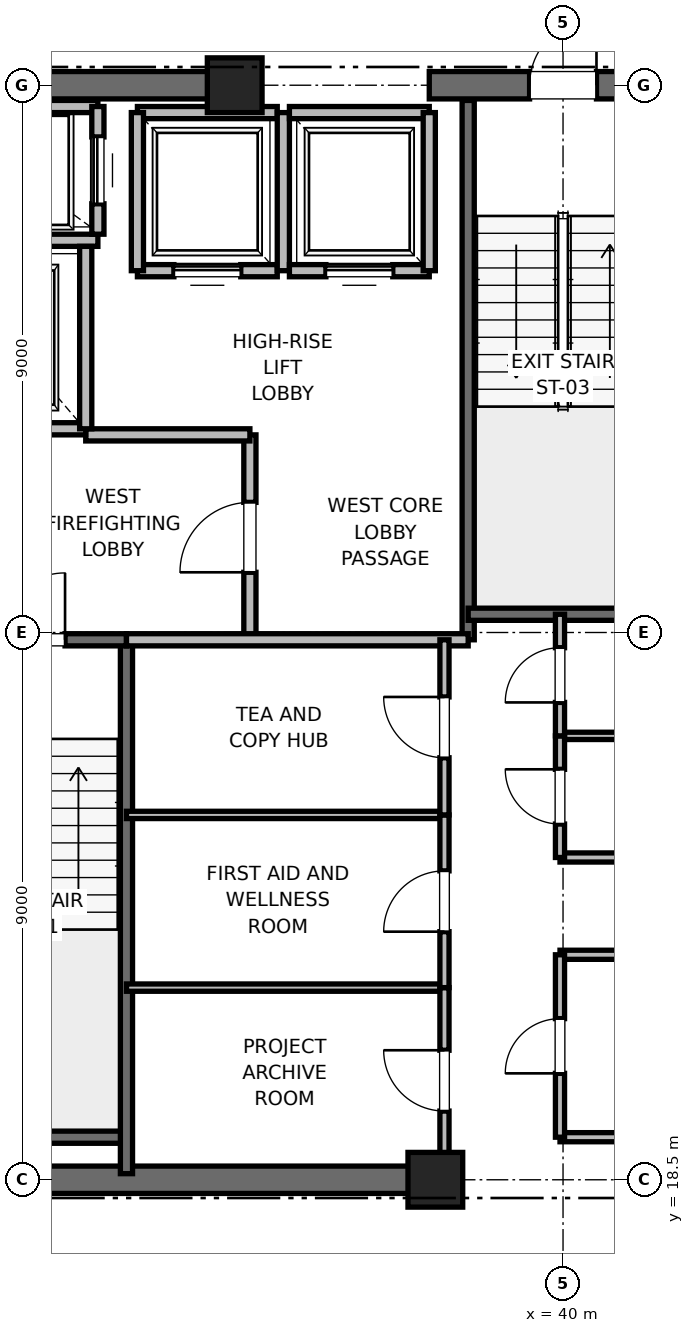
"""IFC4 building model, lengths in metres.
Left out: names, types, materials, properties, quantities, classifications, styles, units other than length and angle.
Written with IfcOpenShell. Run it as: python <this file> out.ifc"""

import sys

from ifc_helpers import new_model, si_unit, direction, frame, frame_2d, origin, origin_2d, place, context, subcontext, project, spatial, rectangle, extrude, element, fill, save


model = new_model("IFC4")
c1 = context("Model", 3, precision=1e-05, world=origin(), true_north=direction((0.0, 1.0)))
c2 = subcontext(c1, "Body", "Model", "MODEL_VIEW")
j1 = project(units=[si_unit("LENGTHUNIT", "METRE"), si_unit("PLANEANGLEUNIT", "RADIAN")], contexts=[c1])
p1 = place(None, origin())
s1 = spatial("IfcSite", under=j1, at=p1, CompositionType="ELEMENT")
p2 = place(p1, origin())
s2 = spatial("IfcBuilding", under=s1, at=p2, CompositionType="ELEMENT")
p3 = place(p2, frame((0.0, 0.0, 271.2)))
s3 = spatial("IfcBuildingStorey", under=s2, at=p3, CompositionType="ELEMENT", Elevation=271.2)
for number, where, z_axis, x_axis in (
    (1, (37.9, 18.5, 0.0), (0.0, 0.0, 1.0), (1.0, 0.0, 0.0)),
    (2, (34.6, 36.5, 0.0), (0.0, 0.0, 1.0), (1.0, 0.0, 0.0)),
):
    element("IfcColumn", number, at=place(p3, frame(where, z_axis=z_axis, x_axis=x_axis)), inside=s3, PredefinedType="PILASTER", context=c2, shape_type="SweptSolid", body=[
        extrude(rectangle(XDim=0.9, YDim=0.9, at=origin_2d()), origin(), (0.0, 0.0, 1.0), 4.0),
    ])
p4 = place(p3, frame((29.0, 18.5, 0.0), z_axis=(0.0, 0.0, 1.0), x_axis=(1.0, 0.0, 0.0)))
e3 = element("IfcWall", 3, at=p4, inside=s3, PredefinedType="SHEAR", context=c2, shape_type="SweptSolid", body=[
    extrude(rectangle(XDim=9.2, YDim=0.45, at=frame_2d((4.6, 0.0))), origin(), (0.0, 0.0, 1.0), 3.785),
])
p5 = place(p3, frame((29.0, 36.5, 0.0), z_axis=(0.0, 0.0, 1.0), x_axis=(1.0, 0.0, 0.0)))
e4 = element("IfcWall", 4, at=p5, inside=s3, PredefinedType="SHEAR", context=c2, shape_type="SweptSolid", body=[
    extrude(rectangle(XDim=5.8, YDim=0.45, at=frame_2d((2.9, 0.0))), origin(), (0.0, 0.0, 1.0), 3.785),
])
p6 = place(p3, frame((37.8, 36.5, 0.0), z_axis=(0.0, 0.0, 1.0), x_axis=(1.0, 0.0, 0.0)))
e5 = element("IfcWall", 5, at=p6, inside=s3, PredefinedType="SHEAR", context=c2, shape_type="SweptSolid", body=[
    extrude(rectangle(XDim=4.4, YDim=0.45, at=frame_2d((2.2, 0.0))), origin(), (0.0, 0.0, 1.0), 3.785),
])
p7 = place(p6, frame((1.65, 0.0, 0.0)))
e6 = element("IfcOpeningElement", 6, at=p7, cuts=e5, PredefinedType="OPENING", context=c2, shape_type="SweptSolid", body=[
    extrude(rectangle(XDim=1.1, YDim=2.15, at=frame_2d((0.55, 1.075))), frame((0.0, 0.225, 0.0), z_axis=(0.0, -1.0, 0.0), x_axis=(1.0, 0.0, 0.0)), (0.0, 0.0, 1.0), 0.45),
])
p8 = place(p3, frame((29.7, 19.2, 0.0), z_axis=(0.0, 0.0, 1.0), x_axis=(1.0, 0.0, 0.0)))
e7 = element("IfcWall", 7, at=p8, inside=s3, PredefinedType="SOLIDWALL", context=c2, shape_type="SweptSolid", body=[
    extrude(rectangle(XDim=3.12, YDim=0.2, at=frame_2d((1.56, 0.0))), origin(), (0.0, 0.0, 1.0), 3.785),
])
p9 = place(p3, frame((32.82, 18.6, 0.0), z_axis=(0.0, 0.0, 1.0), x_axis=(0.0, 1.0, 0.0)))
e8 = element("IfcWall", 8, at=p9, inside=s3, PredefinedType="SOLIDWALL", context=c2, shape_type="SweptSolid", body=[
    extrude(rectangle(XDim=8.78, YDim=0.2, at=frame_2d((4.39, 0.0))), origin(), (0.0, 0.0, 1.0), 3.785),
])
p10 = place(p3, frame((29.7, 27.38, 0.0), z_axis=(0.0, 0.0, 1.0), x_axis=(1.0, 0.0, 0.0)))
e9 = element("IfcWall", 9, at=p10, inside=s3, PredefinedType="SOLIDWALL", context=c2, shape_type="SweptSolid", body=[
    extrude(rectangle(XDim=3.12, YDim=0.2, at=frame_2d((1.56, 0.0))), origin(), (0.0, 0.0, 1.0), 3.785),
])
p11 = place(p10, frame((1.01, 0.0, 0.0)))
e10 = element("IfcOpeningElement", 10, at=p11, cuts=e9, PredefinedType="OPENING", context=c2, shape_type="SweptSolid", body=[
    extrude(rectangle(XDim=1.1, YDim=2.15, at=frame_2d((0.55, 1.075))), frame((0.0, 0.1, 0.0), z_axis=(0.0, -1.0, 0.0), x_axis=(1.0, 0.0, 0.0)), (0.0, 0.0, 1.0), 0.2),
])
p12 = place(p3, frame((38.44, 27.38, 0.0), z_axis=(0.0, 0.0, 1.0), x_axis=(0.0, 1.0, 0.0)))
e11 = element("IfcWall", 11, at=p12, inside=s3, PredefinedType="SOLIDWALL", context=c2, shape_type="SweptSolid", body=[
    extrude(rectangle(XDim=8.87, YDim=0.2, at=frame_2d((4.435, 0.0))), origin(), (0.0, 0.0, 1.0), 3.785),
])
p13 = place(p3, frame((38.44, 27.8, 0.0), z_axis=(0.0, 0.0, 1.0), x_axis=(1.0, 0.0, 0.0)))
e12 = element("IfcWall", 12, at=p13, inside=s3, PredefinedType="SOLIDWALL", context=c2, shape_type="SweptSolid", body=[
    extrude(rectangle(XDim=3.32, YDim=0.2, at=frame_2d((1.66, 0.0))), origin(), (0.0, 0.0, 1.0), 3.785),
])
p14 = place(p3, frame((34.85, 27.38, 0.0), z_axis=(0.0, 0.0, 1.0), x_axis=(0.0, 1.0, 0.0)))
e13 = element("IfcWall", 13, at=p14, inside=s3, PredefinedType="PARTITIONING", context=c2, shape_type="SweptSolid", body=[
    extrude(rectangle(XDim=3.37, YDim=0.2, at=frame_2d((1.685, 0.0))), origin(), (0.0, 0.0, 1.0), 3.785),
])
p15 = place(p14, frame((1.11, 0.0, 0.0)))
e14 = element("IfcOpeningElement", 14, at=p15, cuts=e13, PredefinedType="OPENING", context=c2, shape_type="SweptSolid", body=[
    extrude(rectangle(XDim=1.15, YDim=2.2, at=frame_2d((0.575, 1.1))), frame((0.0, 0.1, 0.0), z_axis=(0.0, -1.0, 0.0), x_axis=(1.0, 0.0, 0.0)), (0.0, 0.0, 1.0), 0.2),
])
p16 = place(p3, frame((32.82, 27.38, 0.0), z_axis=(0.0, 0.0, 1.0), x_axis=(1.0, 0.0, 0.0)))
e15 = element("IfcWall", 15, at=p16, inside=s3, PredefinedType="PARTITIONING", context=c2, shape_type="SweptSolid", body=[
    extrude(rectangle(XDim=5.62, YDim=0.2, at=frame_2d((2.81, 0.0))), origin(), (0.0, 0.0, 1.0), 3.785),
])
p17 = place(p3, frame((32.15, 30.75, 0.0), z_axis=(0.0, 0.0, 1.0), x_axis=(1.0, 0.0, 0.0)))
e16 = element("IfcWall", 16, at=p17, inside=s3, PredefinedType="PARTITIONING", context=c2, shape_type="SweptSolid", body=[
    extrude(rectangle(XDim=2.7, YDim=0.2, at=frame_2d((1.35, 0.0))), origin(), (0.0, 0.0, 1.0), 3.785),
])
p18 = place(p3, frame((29.55, 30.85, 0.0), z_axis=(0.0, 0.0, 1.0), x_axis=(1.0, 0.0, 0.0)))
e17 = element("IfcWall", 17, at=p18, inside=s3, PredefinedType="SOLIDWALL", context=c2, shape_type="SweptSolid", body=[
    extrude(rectangle(XDim=2.6, YDim=0.2, at=frame_2d((1.3, 0.0))), origin(), (0.0, 0.0, 1.0), 2.865),
])
p19 = place(p18, frame((0.75, 0.0, 0.0)))
e18 = element("IfcOpeningElement", 18, at=p19, cuts=e17, PredefinedType="OPENING", context=c2, shape_type="SweptSolid", body=[
    extrude(rectangle(XDim=1.1, YDim=2.2, at=frame_2d((0.55, 1.1))), frame((0.0, 0.1, 0.0), z_axis=(0.0, -1.0, 0.0), x_axis=(1.0, 0.0, 0.0)), (0.0, 0.0, 1.0), 0.2),
])
p20 = place(p3, frame((29.55, 33.95, 0.0), z_axis=(0.0, 0.0, 1.0), x_axis=(1.0, 0.0, 0.0)))
e19 = element("IfcWall", 19, at=p20, inside=s3, PredefinedType="SOLIDWALL", context=c2, shape_type="SweptSolid", body=[
    extrude(rectangle(XDim=2.8, YDim=0.2, at=frame_2d((1.4, 0.0))), origin(), (0.0, 0.0, 1.0), 3.785),
])
p21 = place(p3, frame((32.15, 30.85, 0.0), z_axis=(0.0, 0.0, 1.0), x_axis=(0.0, 1.0, 0.0)))
e20 = element("IfcWall", 20, at=p21, inside=s3, PredefinedType="SOLIDWALL", context=c2, shape_type="SweptSolid", body=[
    extrude(rectangle(XDim=3.0, YDim=0.2, at=frame_2d((1.5, 0.0))), origin(), (0.0, 0.0, 1.0), 3.785),
])
p22 = place(p3, frame((32.35, 36.15, 0.0), z_axis=(0.0, 0.0, 1.0), x_axis=(-1.0, 0.0, 0.0)))
e21 = element("IfcWall", 21, at=p22, inside=s3, PredefinedType="SOLIDWALL", context=c2, shape_type="SweptSolid", body=[
    extrude(rectangle(XDim=2.8, YDim=0.2, at=frame_2d((1.4, 0.0))), origin(), (0.0, 0.0, 1.0), 3.148),
])
p23 = place(p3, frame((32.35, 34.05, 0.0), z_axis=(0.0, 0.0, 1.0), x_axis=(0.0, 1.0, 0.0)))
e22 = element("IfcWall", 22, at=p23, inside=s3, PredefinedType="SOLIDWALL", context=c2, shape_type="SweptSolid", body=[
    extrude(rectangle(XDim=2.1, YDim=0.2, at=frame_2d((1.05, 0.0))), origin(), (0.0, 0.0, 1.0), 3.785),
])
p24 = place(p23, frame((0.5, 0.0, 0.0)))
e23 = element("IfcOpeningElement", 23, at=p24, cuts=e22, PredefinedType="OPENING", context=c2, shape_type="SweptSolid", body=[
    extrude(rectangle(XDim=1.1, YDim=2.2, at=frame_2d((0.55, 1.1))), frame((0.0, 0.1, 0.0), z_axis=(0.0, -1.0, 0.0), x_axis=(1.0, 0.0, 0.0)), (0.0, 0.0, 1.0), 0.2),
])
p25 = place(p3, frame((33.0, 33.45, 0.0), z_axis=(0.0, 0.0, 1.0), x_axis=(1.0, 0.0, 0.0)))
e24 = element("IfcWall", 24, at=p25, inside=s3, PredefinedType="SOLIDWALL", context=c2, shape_type="SweptSolid", body=[
    extrude(rectangle(XDim=2.3, YDim=0.2, at=frame_2d((1.15, 0.0))), origin(), (0.0, 0.0, 1.0), 3.785),
])
p26 = place(p25, frame((0.6, 0.0, 0.0)))
e25 = element("IfcOpeningElement", 25, at=p26, cuts=e24, PredefinedType="OPENING", context=c2, shape_type="SweptSolid", body=[
    extrude(rectangle(XDim=1.1, YDim=2.2, at=frame_2d((0.55, 1.1))), frame((0.0, 0.1, 0.0), z_axis=(0.0, -1.0, 0.0), x_axis=(1.0, 0.0, 0.0)), (0.0, 0.0, 1.0), 0.2),
])
p27 = place(p3, frame((35.3, 36.05, 0.0), z_axis=(0.0, 0.0, 1.0), x_axis=(-1.0, 0.0, 0.0)))
e26 = element("IfcWall", 26, at=p27, inside=s3, PredefinedType="SOLIDWALL", context=c2, shape_type="SweptSolid", body=[
    extrude(rectangle(XDim=2.3, YDim=0.2, at=frame_2d((1.15, 0.0))), origin(), (0.0, 0.0, 1.0), 2.865),
])
p28 = place(p3, frame((33.0, 36.05, 0.0), z_axis=(0.0, 0.0, 1.0), x_axis=(0.0, -1.0, 0.0)))
e27 = element("IfcWall", 27, at=p28, inside=s3, PredefinedType="SOLIDWALL", context=c2, shape_type="SweptSolid", body=[
    extrude(rectangle(XDim=2.6, YDim=0.2, at=frame_2d((1.3, 0.0))), origin(), (0.0, 0.0, 1.0), 3.785),
])
p29 = place(p3, frame((35.4, 33.45, 0.0), z_axis=(0.0, 0.0, 1.0), x_axis=(0.0, 1.0, 0.0)))
e28 = element("IfcWall", 28, at=p29, inside=s3, PredefinedType="SOLIDWALL", context=c2, shape_type="SweptSolid", body=[
    extrude(rectangle(XDim=2.6, YDim=0.2, at=frame_2d((1.3, 0.0))), origin(), (0.0, 0.0, 1.0), 2.865),
])
p30 = place(p3, frame((35.5, 33.45, 0.0), z_axis=(0.0, 0.0, 1.0), x_axis=(1.0, 0.0, 0.0)))
e29 = element("IfcWall", 29, at=p30, inside=s3, PredefinedType="SOLIDWALL", context=c2, shape_type="SweptSolid", body=[
    extrude(rectangle(XDim=2.3, YDim=0.2, at=frame_2d((1.15, 0.0))), origin(), (0.0, 0.0, 1.0), 3.785),
])
p31 = place(p30, frame((0.6, 0.0, 0.0)))
e30 = element("IfcOpeningElement", 30, at=p31, cuts=e29, PredefinedType="OPENING", context=c2, shape_type="SweptSolid", body=[
    extrude(rectangle(XDim=1.1, YDim=2.2, at=frame_2d((0.55, 1.1))), frame((0.0, 0.1, 0.0), z_axis=(0.0, -1.0, 0.0), x_axis=(1.0, 0.0, 0.0)), (0.0, 0.0, 1.0), 0.2),
])
p32 = place(p3, frame((37.8, 36.05, 0.0), z_axis=(0.0, 0.0, 1.0), x_axis=(-1.0, 0.0, 0.0)))
e31 = element("IfcWall", 31, at=p32, inside=s3, PredefinedType="SOLIDWALL", context=c2, shape_type="SweptSolid", body=[
    extrude(rectangle(XDim=2.3, YDim=0.2, at=frame_2d((1.15, 0.0))), origin(), (0.0, 0.0, 1.0), 2.865),
])
p33 = place(p3, frame((37.8, 33.45, 0.0), z_axis=(0.0, 0.0, 1.0), x_axis=(0.0, 1.0, 0.0)))
e32 = element("IfcWall", 32, at=p33, inside=s3, PredefinedType="SOLIDWALL", context=c2, shape_type="SweptSolid", body=[
    extrude(rectangle(XDim=2.6, YDim=0.2, at=frame_2d((1.3, 0.0))), origin(), (0.0, 0.0, 1.0), 2.865),
])
for number, where, z_axis, x_axis in (
    (33, (39.95, 19.2, 0.0), (0.0, 0.0, 1.0), (1.0, 0.0, 0.0)),
    (34, (39.95, 22.2, 0.0), (0.0, 0.0, 1.0), (1.0, 0.0, 0.0)),
    (35, (39.95, 23.8, 0.0), (0.0, 0.0, 1.0), (1.0, 0.0, 0.0)),
):
    element("IfcWall", number, at=place(p3, frame(where, z_axis=z_axis, x_axis=x_axis)), inside=s3, PredefinedType="PARTITIONING", context=c2, shape_type="SweptSolid", body=[
        extrude(rectangle(XDim=1.81, YDim=0.15, at=frame_2d((0.905, 0.0))), origin(), (0.0, 0.0, 1.0), 2.85),
    ])
p34 = place(p3, frame((39.95, 25.8, 0.0), z_axis=(0.0, 0.0, 1.0), x_axis=(1.0, 0.0, 0.0)))
e36 = element("IfcWall", 36, at=p34, inside=s3, PredefinedType="PARTITIONING", context=c2, shape_type="SweptSolid", body=[
    extrude(rectangle(XDim=1.81, YDim=0.12, at=frame_2d((0.905, 0.0))), origin(), (0.0, 0.0, 1.0), 2.85),
])
p35 = place(p3, frame((39.95, 19.2, 0.0), z_axis=(0.0, 0.0, 1.0), x_axis=(0.0, 1.0, 0.0)))
e37 = element("IfcWall", 37, at=p35, inside=s3, PredefinedType="PARTITIONING", context=c2, shape_type="SweptSolid", body=[
    extrude(rectangle(XDim=3.0, YDim=0.15, at=frame_2d((1.5, 0.0))), origin(), (0.0, 0.0, 1.0), 2.85),
])
p36 = place(p35, frame((1.05, 0.0, 0.0)))
e38 = element("IfcOpeningElement", 38, at=p36, cuts=e37, PredefinedType="OPENING", context=c2, shape_type="SweptSolid", body=[
    extrude(rectangle(XDim=0.9, YDim=2.1, at=frame_2d((0.45, 1.05))), frame((0.0, 0.075, 0.0), z_axis=(0.0, -1.0, 0.0), x_axis=(1.0, 0.0, 0.0)), (0.0, 0.0, 1.0), 0.15),
])
p37 = place(p3, frame((39.95, 23.8, 0.0), z_axis=(0.0, 0.0, 1.0), x_axis=(0.0, 1.0, 0.0)))
e39 = element("IfcWall", 39, at=p37, inside=s3, PredefinedType="PARTITIONING", context=c2, shape_type="SweptSolid", body=[
    extrude(rectangle(XDim=2.0, YDim=0.15, at=frame_2d((1.0, 0.0))), origin(), (0.0, 0.0, 1.0), 2.85),
])
p38 = place(p37, frame((0.55, 0.0, 0.0)))
e40 = element("IfcOpeningElement", 40, at=p38, cuts=e39, PredefinedType="OPENING", context=c2, shape_type="SweptSolid", body=[
    extrude(rectangle(XDim=0.9, YDim=2.1, at=frame_2d((0.45, 1.05))), frame((0.0, 0.075, 0.0), z_axis=(0.0, -1.0, 0.0), x_axis=(1.0, 0.0, 0.0)), (0.0, 0.0, 1.0), 0.15),
])
p39 = place(p3, frame((39.95, 25.8, 0.0), z_axis=(0.0, 0.0, 1.0), x_axis=(0.0, 1.0, 0.0)))
e41 = element("IfcWall", 41, at=p39, inside=s3, PredefinedType="PARTITIONING", context=c2, shape_type="SweptSolid", body=[
    extrude(rectangle(XDim=2.0, YDim=0.15, at=frame_2d((1.0, 0.0))), origin(), (0.0, 0.0, 1.0), 2.85),
])
p40 = place(p39, frame((0.55, 0.0, 0.0)))
e42 = element("IfcOpeningElement", 42, at=p40, cuts=e41, PredefinedType="OPENING", context=c2, shape_type="SweptSolid", body=[
    extrude(rectangle(XDim=0.9, YDim=2.1, at=frame_2d((0.45, 1.05))), frame((0.0, 0.075, 0.0), z_axis=(0.0, -1.0, 0.0), x_axis=(1.0, 0.0, 0.0)), (0.0, 0.0, 1.0), 0.15),
])
for number, where, z_axis, x_axis in (
    (43, (32.82, 21.66, 0.0), (0.0, 0.0, 1.0), (1.0, 0.0, 0.0)),
    (44, (32.82, 24.5, 0.0), (0.0, 0.0, 1.0), (1.0, 0.0, 0.0)),
):
    element("IfcWall", number, at=place(p3, frame(where, z_axis=z_axis, x_axis=x_axis)), inside=s3, PredefinedType="PARTITIONING", context=c2, shape_type="SweptSolid", body=[
        extrude(rectangle(XDim=5.23, YDim=0.12, at=frame_2d((2.615, 0.0))), origin(), (0.0, 0.0, 1.0), 2.85),
    ])
p41 = place(p3, frame((38.05, 18.6, 0.0), z_axis=(0.0, 0.0, 1.0), x_axis=(0.0, 1.0, 0.0)))
e45 = element("IfcWall", 45, at=p41, inside=s3, PredefinedType="PARTITIONING", context=c2, shape_type="SweptSolid", body=[
    extrude(rectangle(XDim=3.06, YDim=0.15, at=frame_2d((1.53, 0.0))), origin(), (0.0, 0.0, 1.0), 2.85),
])
p42 = place(p41, frame((1.03, 0.0, 0.0)))
e46 = element("IfcOpeningElement", 46, at=p42, cuts=e45, PredefinedType="OPENING", context=c2, shape_type="SweptSolid", body=[
    extrude(rectangle(XDim=1.0, YDim=2.15, at=frame_2d((0.5, 1.075))), frame((0.0, 0.075, 0.0), z_axis=(0.0, -1.0, 0.0), x_axis=(1.0, 0.0, 0.0)), (0.0, 0.0, 1.0), 0.15),
])
p43 = place(p3, frame((38.05, 21.66, 0.0), z_axis=(0.0, 0.0, 1.0), x_axis=(0.0, 1.0, 0.0)))
e47 = element("IfcWall", 47, at=p43, inside=s3, PredefinedType="PARTITIONING", context=c2, shape_type="SweptSolid", body=[
    extrude(rectangle(XDim=2.84, YDim=0.15, at=frame_2d((1.42, 0.0))), origin(), (0.0, 0.0, 1.0), 2.85),
])
p44 = place(p43, frame((0.92, 0.0, 0.0)))
e48 = element("IfcOpeningElement", 48, at=p44, cuts=e47, PredefinedType="OPENING", context=c2, shape_type="SweptSolid", body=[
    extrude(rectangle(XDim=1.0, YDim=2.15, at=frame_2d((0.5, 1.075))), frame((0.0, 0.075, 0.0), z_axis=(0.0, -1.0, 0.0), x_axis=(1.0, 0.0, 0.0)), (0.0, 0.0, 1.0), 0.15),
])
p45 = place(p3, frame((38.05, 24.5, 0.0), z_axis=(0.0, 0.0, 1.0), x_axis=(0.0, 1.0, 0.0)))
e49 = element("IfcWall", 49, at=p45, inside=s3, PredefinedType="PARTITIONING", context=c2, shape_type="SweptSolid", body=[
    extrude(rectangle(XDim=2.88, YDim=0.15, at=frame_2d((1.44, 0.0))), origin(), (0.0, 0.0, 1.0), 2.85),
])
p46 = place(p45, frame((0.94, 0.0, 0.0)))
e50 = element("IfcOpeningElement", 50, at=p46, cuts=e49, PredefinedType="OPENING", context=c2, shape_type="SweptSolid", body=[
    extrude(rectangle(XDim=1.0, YDim=2.15, at=frame_2d((0.5, 1.075))), frame((0.0, 0.075, 0.0), z_axis=(0.0, -1.0, 0.0), x_axis=(1.0, 0.0, 0.0)), (0.0, 0.0, 1.0), 0.15),
])
p47 = place(p11, origin())
e51 = element("IfcDoor", 51, at=p47, inside=s3, OperationType="SINGLE_SWING_RIGHT", PredefinedType="DOOR", context=c2, shape_type="SweptSolid", body=[
    extrude(rectangle(XDim=1.1, YDim=2.15, at=frame_2d((0.55, 1.075))), frame((0.0, 0.025, 0.0), z_axis=(0.0, -1.0, 0.0), x_axis=(1.0, 0.0, 0.0)), (0.0, 0.0, 1.0), 0.05),
])
fill(e10, e51)
p48 = place(p7, origin())
e52 = element("IfcDoor", 52, at=p48, inside=s3, OperationType="SINGLE_SWING_RIGHT", PredefinedType="DOOR", context=c2, shape_type="SweptSolid", body=[
    extrude(rectangle(XDim=1.1, YDim=2.15, at=frame_2d((0.55, 1.075))), frame((0.0, 0.025, 0.0), z_axis=(0.0, -1.0, 0.0), x_axis=(1.0, 0.0, 0.0)), (0.0, 0.0, 1.0), 0.05),
])
fill(e6, e52)
p49 = place(p15, origin())
e53 = element("IfcDoor", 53, at=p49, inside=s3, OperationType="SINGLE_SWING_LEFT", PredefinedType="DOOR", context=c2, shape_type="SweptSolid", body=[
    extrude(rectangle(XDim=1.15, YDim=2.2, at=frame_2d((0.575, 1.1))), frame((0.0, 0.025, 0.0), z_axis=(0.0, -1.0, 0.0), x_axis=(1.0, 0.0, 0.0)), (0.0, 0.0, 1.0), 0.05),
])
fill(e14, e53)
p50 = place(p24, origin())
e54 = element("IfcDoor", 54, at=p50, inside=s3, OperationType="SLIDING_TO_RIGHT", PredefinedType="DOOR", context=c2, shape_type="SweptSolid", body=[
    extrude(rectangle(XDim=1.1, YDim=2.2, at=frame_2d((0.55, 1.1))), frame((0.0, 0.025, 0.0), z_axis=(0.0, -1.0, 0.0), x_axis=(1.0, 0.0, 0.0)), (0.0, 0.0, 1.0), 0.05),
])
fill(e23, e54)
p51 = place(p26, origin())
e55 = element("IfcDoor", 55, at=p51, inside=s3, OperationType="SLIDING_TO_RIGHT", PredefinedType="DOOR", context=c2, shape_type="SweptSolid", body=[
    extrude(rectangle(XDim=1.1, YDim=2.2, at=frame_2d((0.55, 1.1))), frame((0.0, 0.025, 0.0), z_axis=(0.0, -1.0, 0.0), x_axis=(1.0, 0.0, 0.0)), (0.0, 0.0, 1.0), 0.05),
])
fill(e25, e55)
p52 = place(p31, origin())
e56 = element("IfcDoor", 56, at=p52, inside=s3, OperationType="SLIDING_TO_RIGHT", PredefinedType="DOOR", context=c2, shape_type="SweptSolid", body=[
    extrude(rectangle(XDim=1.1, YDim=2.2, at=frame_2d((0.55, 1.1))), frame((0.0, 0.025, 0.0), z_axis=(0.0, -1.0, 0.0), x_axis=(1.0, 0.0, 0.0)), (0.0, 0.0, 1.0), 0.05),
])
fill(e30, e56)
p53 = place(p36, origin())
e57 = element("IfcDoor", 57, at=p53, inside=s3, OperationType="SINGLE_SWING_LEFT", PredefinedType="DOOR", context=c2, shape_type="SweptSolid", body=[
    extrude(rectangle(XDim=0.9, YDim=2.1, at=frame_2d((0.45, 1.05))), frame((0.0, 0.025, 0.0), z_axis=(0.0, -1.0, 0.0), x_axis=(1.0, 0.0, 0.0)), (0.0, 0.0, 1.0), 0.05),
])
fill(e38, e57)
p54 = place(p38, origin())
e58 = element("IfcDoor", 58, at=p54, inside=s3, OperationType="SINGLE_SWING_RIGHT", PredefinedType="DOOR", context=c2, shape_type="SweptSolid", body=[
    extrude(rectangle(XDim=0.9, YDim=2.1, at=frame_2d((0.45, 1.05))), frame((0.0, 0.025, 0.0), z_axis=(0.0, -1.0, 0.0), x_axis=(1.0, 0.0, 0.0)), (0.0, 0.0, 1.0), 0.05),
])
fill(e40, e58)
p55 = place(p40, origin())
e59 = element("IfcDoor", 59, at=p55, inside=s3, OperationType="SINGLE_SWING_LEFT", PredefinedType="DOOR", context=c2, shape_type="SweptSolid", body=[
    extrude(rectangle(XDim=0.9, YDim=2.1, at=frame_2d((0.45, 1.05))), frame((0.0, 0.025, 0.0), z_axis=(0.0, -1.0, 0.0), x_axis=(1.0, 0.0, 0.0)), (0.0, 0.0, 1.0), 0.05),
])
fill(e42, e59)
p56 = place(p42, origin())
e60 = element("IfcDoor", 60, at=p56, inside=s3, OperationType="SINGLE_SWING_RIGHT", PredefinedType="DOOR", context=c2, shape_type="SweptSolid", body=[
    extrude(rectangle(XDim=1.0, YDim=2.15, at=frame_2d((0.5, 1.075))), frame((0.0, 0.025, 0.0), z_axis=(0.0, -1.0, 0.0), x_axis=(1.0, 0.0, 0.0)), (0.0, 0.0, 1.0), 0.05),
])
fill(e46, e60)
p57 = place(p44, origin())
e61 = element("IfcDoor", 61, at=p57, inside=s3, OperationType="SINGLE_SWING_LEFT", PredefinedType="DOOR", context=c2, shape_type="SweptSolid", body=[
    extrude(rectangle(XDim=1.0, YDim=2.15, at=frame_2d((0.5, 1.075))), frame((0.0, 0.025, 0.0), z_axis=(0.0, -1.0, 0.0), x_axis=(1.0, 0.0, 0.0)), (0.0, 0.0, 1.0), 0.05),
])
fill(e48, e61)
p58 = place(p46, origin())
e62 = element("IfcDoor", 62, at=p58, inside=s3, OperationType="SINGLE_SWING_RIGHT", PredefinedType="DOOR", context=c2, shape_type="SweptSolid", body=[
    extrude(rectangle(XDim=1.0, YDim=2.15, at=frame_2d((0.5, 1.075))), frame((0.0, 0.025, 0.0), z_axis=(0.0, -1.0, 0.0), x_axis=(1.0, 0.0, 0.0)), (0.0, 0.0, 1.0), 0.05),
])
fill(e50, e62)
save(model, sys.argv[1])
